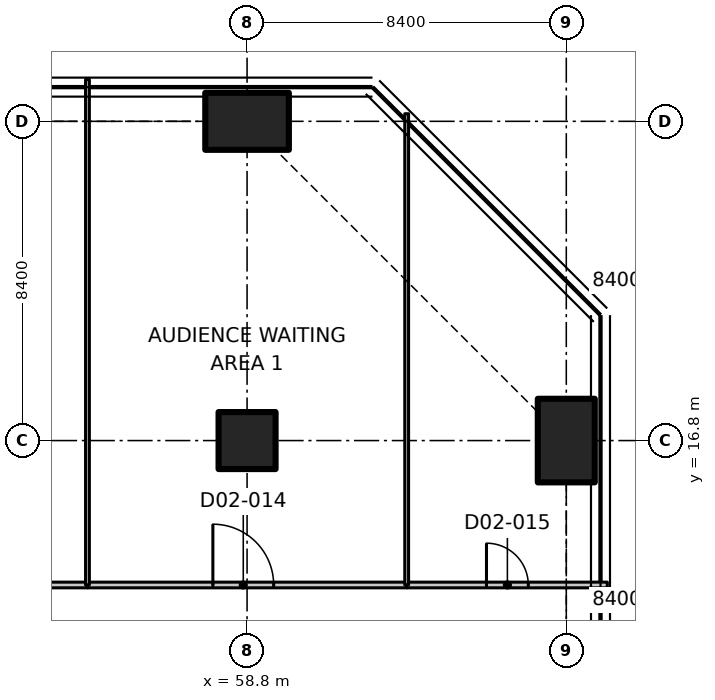
"""IFC4 building model, lengths in metres.
Left out: names, types, materials, properties, quantities, classifications, styles, units other than length and angle.
Written with IfcOpenShell. Run it as: python <this file> out.ifc"""

import sys

from ifc_helpers import new_model, si_unit, direction, frame, frame_2d, origin, origin_2d, place, context, subcontext, project, spatial, polyline, rectangle, outline, extrude, element, fill, save


model = new_model("IFC4")
c1 = context("Model", 3, precision=1e-05, world=origin(), true_north=direction((0.0, 1.0)))
c2 = subcontext(c1, "Body", "Model", "MODEL_VIEW")
j1 = project(units=[si_unit("LENGTHUNIT", "METRE"), si_unit("PLANEANGLEUNIT", "RADIAN")], contexts=[c1])
p1 = place(None, origin())
s1 = spatial("IfcSite", under=j1, at=p1, CompositionType="ELEMENT")
p2 = place(p1, origin())
s2 = spatial("IfcBuilding", under=s1, at=p2, CompositionType="ELEMENT")
p3 = place(p2, frame((0.0, 0.0, 7.0)))
s3 = spatial("IfcBuildingStorey", under=s2, at=p3, CompositionType="ELEMENT", Elevation=7.0)
p4 = place(p3, frame((58.8, 16.8, 0.0), z_axis=(0.0, 0.0, 1.0), x_axis=(1.0, 0.0, 0.0)))
e1 = element("IfcColumn", 1, at=p4, inside=s3, PredefinedType="COLUMN", context=c2, shape_type="SweptSolid", body=[
    extrude(rectangle(XDim=1.5, YDim=1.5, at=origin_2d()), origin(), (0.0, 0.0, 1.0), 5.25),
])
for number, where, z_axis, x_axis in (
    (2, (58.8, 25.2, 0.0), (0.0, 0.0, 1.0), (0.0, 1.0, 0.0)),
    (3, (67.2, 16.8, 0.0), (0.0, 0.0, 1.0), (1.0, 0.0, 0.0)),
):
    element("IfcColumn", number, at=place(p3, frame(where, z_axis=z_axis, x_axis=x_axis)), inside=s3, PredefinedType="COLUMN", context=c2, shape_type="SweptSolid", body=[
        extrude(rectangle(XDim=1.5, YDim=2.2, at=origin_2d()), origin(), (0.0, 0.0, 1.0), 5.25),
    ])
p5 = place(p3, frame((49.4, 13.0, 0.0), z_axis=(0.0, 0.0, 1.0), x_axis=(1.0, 0.0, 0.0)))
e4 = element("IfcWall", 4, at=p5, inside=s3, PredefinedType="PARTITIONING", context=c2, shape_type="SweptSolid", body=[
    extrude(rectangle(XDim=5.2, YDim=0.15, at=frame_2d((2.6, 0.0))), origin(), (0.0, 0.0, 1.0), 5.23),
])
p6 = place(p3, frame((54.6, 13.0, 0.0), z_axis=(0.0, 0.0, 1.0), x_axis=(1.0, 0.0, 0.0)))
e5 = element("IfcWall", 5, at=p6, inside=s3, PredefinedType="PARTITIONING", context=c2, shape_type="SweptSolid", body=[
    extrude(rectangle(XDim=8.4, YDim=0.15, at=frame_2d((4.2, 0.0))), origin(), (0.0, 0.0, 1.0), 5.23),
])
p7 = place(p6, frame((3.3, 0.0, 0.0)))
e6 = element("IfcOpeningElement", 6, at=p7, cuts=e5, PredefinedType="OPENING", context=c2, shape_type="SweptSolid", body=[
    extrude(rectangle(XDim=1.6, YDim=2.1, at=frame_2d((0.8, 1.05))), frame((0.0, 0.085, 0.0), z_axis=(0.0, -1.0, 0.0), x_axis=(1.0, 0.0, 0.0)), (0.0, 0.0, 1.0), 0.17),
])
p8 = place(p3, frame((63.0, 13.0, 0.0), z_axis=(0.0, 0.0, 1.0), x_axis=(1.0, 0.0, 0.0)))
e7 = element("IfcWall", 7, at=p8, inside=s3, PredefinedType="PARTITIONING", context=c2, shape_type="SweptSolid", body=[
    extrude(outline(polyline([(0.0, 0.0), (5.28, 0.0), (5.28, 5.23), (4.65, 5.23), (4.648, 4.88), (3.752, 4.88), (3.75, 5.23), (0.0, 5.23), (0.0, 0.0)])), frame((0.0, 0.075, 0.0), z_axis=(0.0, -1.0, 0.0), x_axis=(1.0, 0.0, 0.0)), (0.0, 0.0, 1.0), 0.15),
])
p9 = place(p8, frame((2.1, 0.0, 0.0)))
e8 = element("IfcOpeningElement", 8, at=p9, cuts=e7, PredefinedType="OPENING", context=c2, shape_type="SweptSolid", body=[
    extrude(rectangle(XDim=1.1, YDim=2.1, at=frame_2d((0.55, 1.05))), frame((0.0, 0.085, 0.0), z_axis=(0.0, -1.0, 0.0), x_axis=(1.0, 0.0, 0.0)), (0.0, 0.0, 1.0), 0.17),
])
p10 = place(p3, frame((54.6, 26.3, 0.0), z_axis=(0.0, 0.0, 1.0), x_axis=(0.0, -1.0, 0.0)))
e9 = element("IfcWall", 9, at=p10, inside=s3, PredefinedType="PARTITIONING", context=c2, shape_type="SweptSolid", body=[
    extrude(outline(polyline([(0.0, 0.0), (13.3, 0.0), (13.3, 5.23), (1.55, 5.23), (1.548, 4.88), (0.652, 4.88), (0.65, 5.23), (0.0, 5.23), (0.0, 0.0)])), frame((0.0, 0.05, 0.0), z_axis=(0.0, -1.0, 0.0), x_axis=(1.0, 0.0, 0.0)), (0.0, 0.0, 1.0), 0.1),
])
p11 = place(p3, frame((63.0, 25.4, 0.0), z_axis=(0.0, 0.0, 1.0), x_axis=(0.0, -1.0, 0.0)))
e10 = element("IfcWall", 10, at=p11, inside=s3, PredefinedType="PARTITIONING", context=c2, shape_type="SweptSolid", body=[
    extrude(outline(polyline([(0.0, 0.0), (12.4, 0.0), (12.4, 5.23), (5.066, 5.23), (5.064, 4.88), (3.736, 4.88), (3.734, 5.23), (0.0, 5.23), (0.0, 0.0)])), frame((0.0, 0.05, 0.0), z_axis=(0.0, -1.0, 0.0), x_axis=(1.0, 0.0, 0.0)), (0.0, 0.0, 1.0), 0.1),
])
p12 = place(p7, origin())
e11 = element("IfcDoor", 11, at=p12, inside=s3, OperationType="DOUBLE_DOOR_SINGLE_SWING", PredefinedType="DOOR", context=c2, shape_type="SweptSolid", body=[
    extrude(rectangle(XDim=1.6, YDim=2.1, at=frame_2d((0.8, 1.05))), frame((0.0, 0.025, 0.0), z_axis=(0.0, -1.0, 0.0), x_axis=(1.0, 0.0, 0.0)), (0.0, 0.0, 1.0), 0.05),
])
fill(e6, e11)
p13 = place(p9, origin())
e12 = element("IfcDoor", 12, at=p13, inside=s3, OperationType="SINGLE_SWING_LEFT", PredefinedType="DOOR", context=c2, shape_type="SweptSolid", body=[
    extrude(rectangle(XDim=1.1, YDim=2.1, at=frame_2d((0.55, 1.05))), frame((0.0, 0.025, 0.0), z_axis=(0.0, -1.0, 0.0), x_axis=(1.0, 0.0, 0.0)), (0.0, 0.0, 1.0), 0.05),
])
fill(e8, e12)
save(model, sys.argv[1])
